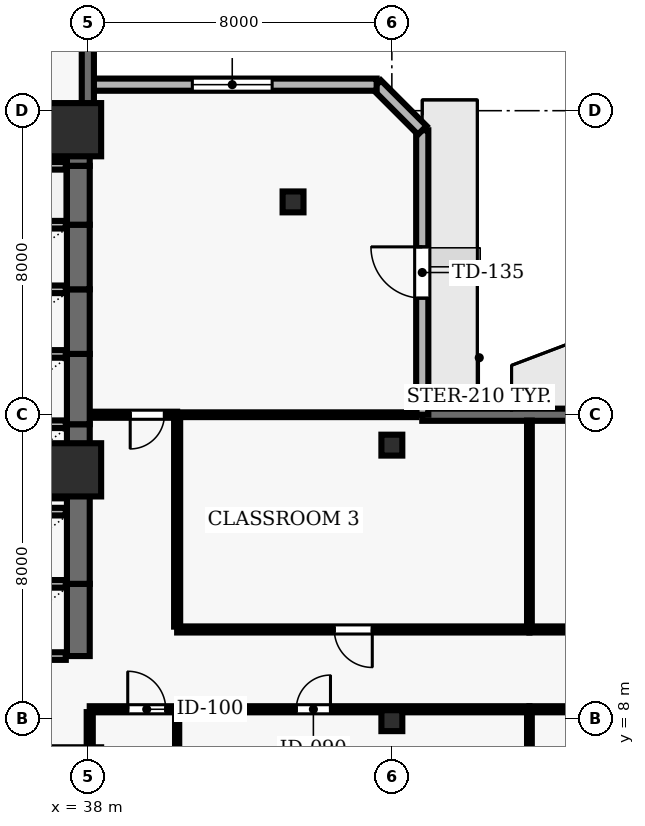
"""IFC4 building model, lengths in metres.
Left out: names, types, materials, properties, quantities, classifications, styles, units other than length and angle.
Written with IfcOpenShell. Run it as: python <this file> out.ifc"""

import sys

from ifc_helpers import new_model, si_unit, direction, frame, frame_2d, origin, origin_2d, place, context, subcontext, project, spatial, rectangle, hollow_rectangle, extrude, element, fill, save


model = new_model("IFC4")
c1 = context("Model", 3, precision=1e-05, world=origin(), true_north=direction((0.0, 1.0)))
c2 = subcontext(c1, "Body", "Model", "MODEL_VIEW")
j1 = project(units=[si_unit("LENGTHUNIT", "METRE"), si_unit("PLANEANGLEUNIT", "RADIAN")], contexts=[c1])
p1 = place(None, origin())
s1 = spatial("IfcSite", under=j1, at=p1, CompositionType="ELEMENT")
p2 = place(p1, origin())
s2 = spatial("IfcBuilding", under=s1, at=p2, CompositionType="ELEMENT")
p3 = place(p2, frame((0.0, 0.0, 85.6)))
s3 = spatial("IfcBuildingStorey", under=s2, at=p3, CompositionType="ELEMENT", Elevation=85.6)
for number, where, z_axis, x_axis in (
    (1, (37.65, 14.55, 0.0), (0.0, 0.0, 1.0), (1.0, 0.0, 0.0)),
    (2, (37.65, 23.5, 0.0), (0.0, 0.0, 1.0), (1.0, 0.0, 0.0)),
):
    element("IfcColumn", number, at=place(p3, frame(where, z_axis=z_axis, x_axis=x_axis)), inside=s3, PredefinedType="COLUMN", context=c2, shape_type="SweptSolid", body=[
        extrude(rectangle(XDim=1.4, YDim=1.4, at=origin_2d()), origin(), (0.0, 0.0, 1.0), 3.9),
    ])
for number, where, z_axis, x_axis in (
    (3, (46.0, 7.95, 0.0), (0.0, 0.0, 1.0), (1.0, 0.0, 0.0)),
    (4, (46.0, 15.2, 0.0), (0.0, 0.0, 1.0), (1.0, 0.0, 0.0)),
    (5, (43.4, 21.6, 0.0), (0.0, 0.0, 1.0), (1.0, 0.0, 0.0)),
):
    element("IfcColumn", number, at=place(p3, frame(where, z_axis=z_axis, x_axis=x_axis)), inside=s3, PredefinedType="COLUMN", context=c2, shape_type="SweptSolid", body=[
        extrude(hollow_rectangle(XDim=0.55, YDim=0.55, WallThickness=0.025, at=origin_2d()), origin(), (0.0, 0.0, 1.0), 3.9),
    ])
p4 = place(p3, frame((73.5, 16.0, 0.0), z_axis=(0.0, 0.0, 1.0), x_axis=(-1.0, 0.0, 0.0)))
e6 = element("IfcWall", 6, at=p4, inside=s3, PredefinedType="SOLIDWALL", context=c2, shape_type="SweptSolid", body=[
    extrude(rectangle(XDim=26.7, YDim=0.32, at=frame_2d((13.35, 0.0))), origin(), (0.0, 0.0, 1.0), 3.69),
])
p5 = place(p4, frame((12.025, 0.0, 0.0)))
e7 = element("IfcOpeningElement", 7, at=p5, cuts=e6, PredefinedType="OPENING", context=c2, shape_type="SweptSolid", body=[
    extrude(rectangle(XDim=1.0, YDim=2.2, at=frame_2d((0.5, 1.1))), frame((0.0, 0.17, 0.0), z_axis=(0.0, -1.0, 0.0), x_axis=(1.0, 0.0, 0.0)), (0.0, 0.0, 1.0), 0.34),
])
p6 = place(p4, frame((2.738, 0.0, 0.9)))
e8 = element("IfcOpeningElement", 8, at=p6, cuts=e6, PredefinedType="OPENING", context=c2, shape_type="SweptSolid", body=[
    extrude(rectangle(XDim=1.2, YDim=1.6, at=frame_2d((0.6, 0.8))), frame((0.0, 0.17, 0.0), z_axis=(0.0, -1.0, 0.0), x_axis=(1.0, 0.0, 0.0)), (0.0, 0.0, 1.0), 0.34),
])
p7 = place(p4, frame((8.513, 0.0, 0.9)))
e9 = element("IfcOpeningElement", 9, at=p7, cuts=e6, PredefinedType="OPENING", context=c2, shape_type="SweptSolid", body=[
    extrude(rectangle(XDim=1.2, YDim=1.6, at=frame_2d((0.6, 0.8))), frame((0.0, 0.17, 0.0), z_axis=(0.0, -1.0, 0.0), x_axis=(1.0, 0.0, 0.0)), (0.0, 0.0, 1.0), 0.34),
])
p8 = place(p4, frame((16.537, 0.0, 0.9)))
e10 = element("IfcOpeningElement", 10, at=p8, cuts=e6, PredefinedType="OPENING", context=c2, shape_type="SweptSolid", body=[
    extrude(rectangle(XDim=1.2, YDim=1.6, at=frame_2d((0.6, 0.8))), frame((0.0, 0.17, 0.0), z_axis=(0.0, -1.0, 0.0), x_axis=(1.0, 0.0, 0.0)), (0.0, 0.0, 1.0), 0.34),
])
p9 = place(p3, frame((46.8, 16.0, 0.0), z_axis=(0.0, 0.0, 1.0), x_axis=(0.0, 1.0, 0.0)))
e11 = element("IfcWall", 11, at=p9, inside=s3, PredefinedType="SOLIDWALL", context=c2, shape_type="SweptSolid", body=[
    extrude(rectangle(XDim=7.485, YDim=0.32, at=frame_2d((3.743, 0.0))), origin(), (0.0, 0.0, 1.0), 3.69),
])
p10 = place(p9, frame((3.067, 0.0, 0.0)))
e12 = element("IfcOpeningElement", 12, at=p10, cuts=e11, PredefinedType="OPENING", context=c2, shape_type="SweptSolid", body=[
    extrude(rectangle(XDim=1.35, YDim=2.2, at=frame_2d((0.675, 1.1))), frame((0.0, 0.17, 0.0), z_axis=(0.0, -1.0, 0.0), x_axis=(1.0, 0.0, 0.0)), (0.0, 0.0, 1.0), 0.34),
])
p11 = place(p3, frame((46.8, 23.485, 0.0), z_axis=(0.0, 0.0, 1.0), x_axis=(-0.707106781187, 0.707106781187, 0.0)))
e13 = element("IfcWall", 13, at=p11, inside=s3, PredefinedType="SOLIDWALL", context=c2, shape_type="SweptSolid", body=[
    extrude(rectangle(XDim=1.697, YDim=0.32, at=frame_2d((0.849, 0.0))), origin(), (0.0, 0.0, 1.0), 3.69),
])
p12 = place(p3, frame((45.6, 24.685, 0.0), z_axis=(0.0, 0.0, 1.0), x_axis=(-1.0, 0.0, 0.0)))
e14 = element("IfcWall", 14, at=p12, inside=s3, PredefinedType="SOLIDWALL", context=c2, shape_type="SweptSolid", body=[
    extrude(rectangle(XDim=7.6, YDim=0.32, at=frame_2d((3.8, 0.0))), origin(), (0.0, 0.0, 1.0), 3.69),
])
p13 = place(p12, frame((2.75, 0.0, 0.9)))
e15 = element("IfcOpeningElement", 15, at=p13, cuts=e14, PredefinedType="OPENING", context=c2, shape_type="SweptSolid", body=[
    extrude(rectangle(XDim=2.1, YDim=1.6, at=frame_2d((1.05, 0.8))), frame((0.0, 0.17, 0.0), z_axis=(0.0, -1.0, 0.0), x_axis=(1.0, 0.0, 0.0)), (0.0, 0.0, 1.0), 0.34),
])
p14 = place(p3, frame((38.0, 24.0, 0.0), z_axis=(0.0, 0.0, 1.0), x_axis=(0.0, 1.0, 0.0)))
e16 = element("IfcWall", 16, at=p14, inside=s3, PredefinedType="SOLIDWALL", context=c2, shape_type="SweptSolid", body=[
    extrude(rectangle(XDim=27.5, YDim=0.32, at=frame_2d((13.75, 0.0))), origin(), (0.0, 0.0, 1.0), 3.69),
])
p15 = place(p14, frame((13.333, 0.0, 0.0)))
e17 = element("IfcOpeningElement", 17, at=p15, cuts=e16, PredefinedType="OPENING", context=c2, shape_type="SweptSolid", body=[
    extrude(rectangle(XDim=1.0, YDim=2.2, at=frame_2d((0.5, 1.1))), frame((0.0, 0.17, 0.0), z_axis=(0.0, -1.0, 0.0), x_axis=(1.0, 0.0, 0.0)), (0.0, 0.0, 1.0), 0.34),
])
p16 = place(p14, frame((2.152, 0.0, 0.9)))
e18 = element("IfcOpeningElement", 18, at=p16, cuts=e16, PredefinedType="OPENING", context=c2, shape_type="SweptSolid", body=[
    extrude(rectangle(XDim=2.4, YDim=1.6, at=frame_2d((1.2, 0.8))), frame((0.0, 0.17, 0.0), z_axis=(0.0, -1.0, 0.0), x_axis=(1.0, 0.0, 0.0)), (0.0, 0.0, 1.0), 0.34),
])
p17 = place(p14, frame((7.956, 0.0, 0.9)))
e19 = element("IfcOpeningElement", 19, at=p17, cuts=e16, PredefinedType="OPENING", context=c2, shape_type="SweptSolid", body=[
    extrude(rectangle(XDim=2.4, YDim=1.6, at=frame_2d((1.2, 0.8))), frame((0.0, 0.17, 0.0), z_axis=(0.0, -1.0, 0.0), x_axis=(1.0, 0.0, 0.0)), (0.0, 0.0, 1.0), 0.34),
])
p18 = place(p14, frame((22.713, 0.0, 0.9)))
e20 = element("IfcOpeningElement", 20, at=p18, cuts=e16, PredefinedType="OPENING", context=c2, shape_type="SweptSolid", body=[
    extrude(rectangle(XDim=2.4, YDim=1.6, at=frame_2d((1.2, 0.8))), frame((0.0, 0.17, 0.0), z_axis=(0.0, -1.0, 0.0), x_axis=(1.0, 0.0, 0.0)), (0.0, 0.0, 1.0), 0.34),
])
p19 = place(p3, frame((37.75, 9.65, 0.0), z_axis=(0.0, 0.0, 1.0), x_axis=(0.0, 1.0, 0.0)))
e21 = element("IfcWall", 21, at=p19, inside=s3, PredefinedType="SHEAR", context=c2, shape_type="SweptSolid", body=[
    extrude(rectangle(XDim=1.9, YDim=0.6, at=frame_2d((0.95, 0.0))), origin(), (0.0, 0.0, 1.0), 3.69),
])
for number, where, z_axis, x_axis in (
    (22, (35.28, 9.65, 0.0), (0.0, 0.0, 1.0), (1.0, 0.0, 0.0)),
    (23, (37.42, 11.55, 0.0), (0.0, 0.0, 1.0), (-1.0, 0.0, 0.0)),
):
    element("IfcWall", number, at=place(p3, frame(where, z_axis=z_axis, x_axis=x_axis)), inside=s3, PredefinedType="SOLIDWALL", context=c2, shape_type="SweptSolid", body=[
        extrude(rectangle(XDim=2.14, YDim=0.2, at=frame_2d((1.07, 0.0))), origin(), (0.0, 0.0, 1.0), 3.69),
    ])
p20 = place(p3, frame((37.75, 11.55, 0.0), z_axis=(0.0, 0.0, 1.0), x_axis=(0.0, 1.0, 0.0)))
e24 = element("IfcWall", 24, at=p20, inside=s3, PredefinedType="SHEAR", context=c2, shape_type="SweptSolid", body=[
    extrude(rectangle(XDim=2.35, YDim=0.6, at=frame_2d((1.175, 0.0))), origin(), (0.0, 0.0, 1.0), 3.69),
])
p21 = place(p3, frame((37.42, 13.45, 0.0), z_axis=(0.0, 0.0, 1.0), x_axis=(-1.0, 0.0, 0.0)))
e25 = element("IfcWall", 25, at=p21, inside=s3, PredefinedType="SOLIDWALL", context=c2, shape_type="SweptSolid", body=[
    extrude(rectangle(XDim=2.14, YDim=0.2, at=frame_2d((1.07, 0.0))), origin(), (0.0, 0.0, 1.0), 3.69),
])
p22 = place(p3, frame((37.75, 13.9, 0.0), z_axis=(0.0, 0.0, 1.0), x_axis=(0.0, 1.0, 0.0)))
e26 = element("IfcWall", 26, at=p22, inside=s3, PredefinedType="SHEAR", context=c2, shape_type="SweptSolid", body=[
    extrude(rectangle(XDim=1.85, YDim=0.6, at=frame_2d((0.925, 0.0))), origin(), (0.0, 0.0, 1.0), 3.69),
])
for number, where, z_axis, x_axis in (
    (27, (35.28, 13.9, 0.0), (0.0, 0.0, 1.0), (1.0, 0.0, 0.0)),
    (28, (37.42, 15.75, 0.0), (0.0, 0.0, 1.0), (-1.0, 0.0, 0.0)),
):
    element("IfcWall", number, at=place(p3, frame(where, z_axis=z_axis, x_axis=x_axis)), inside=s3, PredefinedType="SOLIDWALL", context=c2, shape_type="SweptSolid", body=[
        extrude(rectangle(XDim=2.14, YDim=0.2, at=frame_2d((1.07, 0.0))), origin(), (0.0, 0.0, 1.0), 3.69),
    ])
p23 = place(p3, frame((37.75, 15.75, 0.0), z_axis=(0.0, 0.0, 1.0), x_axis=(0.0, 1.0, 0.0)))
e29 = element("IfcWall", 29, at=p23, inside=s3, PredefinedType="SHEAR", context=c2, shape_type="SweptSolid", body=[
    extrude(rectangle(XDim=1.85, YDim=0.6, at=frame_2d((0.925, 0.0))), origin(), (0.0, 0.0, 1.0), 3.69),
])
p24 = place(p3, frame((37.42, 17.6, 0.0), z_axis=(0.0, 0.0, 1.0), x_axis=(-1.0, 0.0, 0.0)))
e30 = element("IfcWall", 30, at=p24, inside=s3, PredefinedType="SOLIDWALL", context=c2, shape_type="SweptSolid", body=[
    extrude(rectangle(XDim=2.14, YDim=0.2, at=frame_2d((1.07, 0.0))), origin(), (0.0, 0.0, 1.0), 3.69),
])
p25 = place(p3, frame((37.75, 17.6, 0.0), z_axis=(0.0, 0.0, 1.0), x_axis=(0.0, 1.0, 0.0)))
e31 = element("IfcWall", 31, at=p25, inside=s3, PredefinedType="SHEAR", context=c2, shape_type="SweptSolid", body=[
    extrude(rectangle(XDim=1.7, YDim=0.6, at=frame_2d((0.85, 0.0))), origin(), (0.0, 0.0, 1.0), 3.69),
])
p26 = place(p3, frame((37.42, 19.3, 0.0), z_axis=(0.0, 0.0, 1.0), x_axis=(-1.0, 0.0, 0.0)))
e32 = element("IfcWall", 32, at=p26, inside=s3, PredefinedType="SOLIDWALL", context=c2, shape_type="SweptSolid", body=[
    extrude(rectangle(XDim=2.14, YDim=0.2, at=frame_2d((1.07, 0.0))), origin(), (0.0, 0.0, 1.0), 3.69),
])
p27 = place(p3, frame((37.75, 19.3, 0.0), z_axis=(0.0, 0.0, 1.0), x_axis=(0.0, 1.0, 0.0)))
e33 = element("IfcWall", 33, at=p27, inside=s3, PredefinedType="SHEAR", context=c2, shape_type="SweptSolid", body=[
    extrude(rectangle(XDim=1.7, YDim=0.6, at=frame_2d((0.85, 0.0))), origin(), (0.0, 0.0, 1.0), 3.69),
])
p28 = place(p3, frame((37.42, 21.0, 0.0), z_axis=(0.0, 0.0, 1.0), x_axis=(-1.0, 0.0, 0.0)))
e34 = element("IfcWall", 34, at=p28, inside=s3, PredefinedType="SOLIDWALL", context=c2, shape_type="SweptSolid", body=[
    extrude(rectangle(XDim=2.14, YDim=0.2, at=frame_2d((1.07, 0.0))), origin(), (0.0, 0.0, 1.0), 3.69),
])
p29 = place(p3, frame((37.75, 21.0, 0.0), z_axis=(0.0, 0.0, 1.0), x_axis=(0.0, 1.0, 0.0)))
e35 = element("IfcWall", 35, at=p29, inside=s3, PredefinedType="SHEAR", context=c2, shape_type="SweptSolid", body=[
    extrude(rectangle(XDim=1.55, YDim=0.6, at=frame_2d((0.775, 0.0))), origin(), (0.0, 0.0, 1.0), 3.69),
])
p30 = place(p3, frame((37.42, 22.55, 0.0), z_axis=(0.0, 0.0, 1.0), x_axis=(-1.0, 0.0, 0.0)))
e36 = element("IfcWall", 36, at=p30, inside=s3, PredefinedType="SOLIDWALL", context=c2, shape_type="SweptSolid", body=[
    extrude(rectangle(XDim=2.14, YDim=0.2, at=frame_2d((1.07, 0.0))), origin(), (0.0, 0.0, 1.0), 3.69),
])
p31 = place(p3, frame((37.75, 22.55, 0.0), z_axis=(0.0, 0.0, 1.0), x_axis=(0.0, 1.0, 0.0)))
e37 = element("IfcWall", 37, at=p31, inside=s3, PredefinedType="SHEAR", context=c2, shape_type="SweptSolid", body=[
    extrude(rectangle(XDim=1.5, YDim=0.6, at=frame_2d((0.75, 0.0))), origin(), (0.0, 0.0, 1.0), 3.69),
])
p32 = place(p3, frame((37.42, 24.05, 0.0), z_axis=(0.0, 0.0, 1.0), x_axis=(-1.0, 0.0, 0.0)))
e38 = element("IfcWall", 38, at=p32, inside=s3, PredefinedType="SOLIDWALL", context=c2, shape_type="SweptSolid", body=[
    extrude(rectangle(XDim=2.14, YDim=0.2, at=frame_2d((1.07, 0.0))), origin(), (0.0, 0.0, 1.0), 3.69),
])
p33 = place(p3, frame((38.05, 8.25, 0.0), z_axis=(0.0, 0.0, 1.0), x_axis=(1.0, 0.0, 0.0)))
e39 = element("IfcWall", 39, at=p33, inside=s3, PredefinedType="PARTITIONING", context=c2, shape_type="SweptSolid", body=[
    extrude(rectangle(XDim=2.3, YDim=0.16, at=frame_2d((1.15, 0.0))), origin(), (0.0, 0.0, 1.0), 2.995),
])
p34 = place(p33, frame((1.0, 0.0, 0.0)))
e40 = element("IfcOpeningElement", 40, at=p34, cuts=e39, PredefinedType="OPENING", context=c2, shape_type="SweptSolid", body=[
    extrude(rectangle(XDim=1.0, YDim=2.1, at=frame_2d((0.5, 1.05))), frame((0.0, 0.09, 0.0), z_axis=(0.0, -1.0, 0.0), x_axis=(1.0, 0.0, 0.0)), (0.0, 0.0, 1.0), 0.18),
])
p35 = place(p3, frame((40.35, 8.25, 0.0), z_axis=(0.0, 0.0, 1.0), x_axis=(1.0, 0.0, 0.0)))
e41 = element("IfcWall", 41, at=p35, inside=s3, PredefinedType="PARTITIONING", context=c2, shape_type="SweptSolid", body=[
    extrude(rectangle(XDim=9.27, YDim=0.16, at=frame_2d((4.635, 0.0))), origin(), (0.0, 0.0, 1.0), 2.995),
])
p36 = place(p35, frame((3.135, 0.0, 0.0)))
e42 = element("IfcOpeningElement", 42, at=p36, cuts=e41, PredefinedType="OPENING", context=c2, shape_type="SweptSolid", body=[
    extrude(rectangle(XDim=0.9, YDim=2.1, at=frame_2d((0.45, 1.05))), frame((0.0, 0.09, 0.0), z_axis=(0.0, -1.0, 0.0), x_axis=(1.0, 0.0, 0.0)), (0.0, 0.0, 1.0), 0.18),
])
p37 = place(p3, frame((40.35, 16.0, 0.0), z_axis=(0.0, 0.0, 1.0), x_axis=(1.0, 0.0, 0.0)))
e43 = element("IfcWall", 43, at=p37, inside=s3, PredefinedType="PARTITIONING", context=c2, shape_type="SweptSolid", body=[
    extrude(rectangle(XDim=6.295, YDim=0.125, at=frame_2d((3.147, 0.0))), origin(), (0.0, 0.0, 1.0), 3.39),
])
p38 = place(p3, frame((40.35, 16.0, 0.0), z_axis=(0.0, 0.0, 1.0), x_axis=(-1.0, 0.0, 0.0)))
e44 = element("IfcWall", 44, at=p38, inside=s3, PredefinedType="PARTITIONING", context=c2, shape_type="SweptSolid", body=[
    extrude(rectangle(XDim=2.27, YDim=0.16, at=frame_2d((1.135, 0.0))), origin(), (0.0, 0.0, 1.0), 3.69),
])
p39 = place(p38, frame((0.335, 0.0, 0.0)))
e45 = element("IfcOpeningElement", 45, at=p39, cuts=e44, PredefinedType="OPENING", context=c2, shape_type="SweptSolid", body=[
    extrude(rectangle(XDim=0.9, YDim=2.1, at=frame_2d((0.45, 1.05))), frame((0.0, 0.09, 0.0), z_axis=(0.0, -1.0, 0.0), x_axis=(1.0, 0.0, 0.0)), (0.0, 0.0, 1.0), 0.18),
])
p40 = place(p3, frame((49.62, 8.25, 0.0), z_axis=(0.0, 0.0, 1.0), x_axis=(1.0, 0.0, 0.0)))
e46 = element("IfcWall", 46, at=p40, inside=s3, PredefinedType="PARTITIONING", context=c2, shape_type="SweptSolid", body=[
    extrude(rectangle(XDim=9.62, YDim=0.16, at=frame_2d((4.81, 0.0))), origin(), (0.0, 0.0, 1.0), 2.995),
])
p41 = place(p40, frame((4.36, 0.0, 0.0)))
e47 = element("IfcOpeningElement", 47, at=p41, cuts=e46, PredefinedType="OPENING", context=c2, shape_type="SweptSolid", body=[
    extrude(rectangle(XDim=0.9, YDim=2.1, at=frame_2d((0.45, 1.05))), frame((0.0, 0.09, 0.0), z_axis=(0.0, -1.0, 0.0), x_axis=(1.0, 0.0, 0.0)), (0.0, 0.0, 1.0), 0.18),
])
p42 = place(p3, frame((49.62, 10.35, 0.0), z_axis=(0.0, 0.0, 1.0), x_axis=(-1.0, 0.0, 0.0)))
e48 = element("IfcWall", 48, at=p42, inside=s3, PredefinedType="PARTITIONING", context=c2, shape_type="SweptSolid", body=[
    extrude(rectangle(XDim=9.27, YDim=0.16, at=frame_2d((4.635, 0.0))), origin(), (0.0, 0.0, 1.0), 3.227),
])
p43 = place(p42, frame((4.135, 0.0, 0.0)))
e49 = element("IfcOpeningElement", 49, at=p43, cuts=e48, PredefinedType="OPENING", context=c2, shape_type="SweptSolid", body=[
    extrude(rectangle(XDim=1.0, YDim=2.1, at=frame_2d((0.5, 1.05))), frame((0.0, 0.09, 0.0), z_axis=(0.0, -1.0, 0.0), x_axis=(1.0, 0.0, 0.0)), (0.0, 0.0, 1.0), 0.18),
])
p44 = place(p3, frame((59.24, 10.35, 0.0), z_axis=(0.0, 0.0, 1.0), x_axis=(-1.0, 0.0, 0.0)))
e50 = element("IfcWall", 50, at=p44, inside=s3, PredefinedType="PARTITIONING", context=c2, shape_type="SweptSolid", body=[
    extrude(rectangle(XDim=9.62, YDim=0.16, at=frame_2d((4.81, 0.0))), origin(), (0.0, 0.0, 1.0), 3.227),
])
p45 = place(p44, frame((4.31, 0.0, 0.0)))
e51 = element("IfcOpeningElement", 51, at=p45, cuts=e50, PredefinedType="OPENING", context=c2, shape_type="SweptSolid", body=[
    extrude(rectangle(XDim=1.0, YDim=2.1, at=frame_2d((0.5, 1.05))), frame((0.0, 0.09, 0.0), z_axis=(0.0, -1.0, 0.0), x_axis=(1.0, 0.0, 0.0)), (0.0, 0.0, 1.0), 0.18),
])
p46 = place(p3, frame((38.05, 7.05, 0.0), z_axis=(0.0, 0.0, 1.0), x_axis=(0.0, 1.0, 0.0)))
e52 = element("IfcWall", 52, at=p46, inside=s3, PredefinedType="PARTITIONING", context=c2, shape_type="SweptSolid", body=[
    extrude(rectangle(XDim=1.125, YDim=0.16, at=frame_2d((0.562, 0.0))), origin(), (0.0, 0.0, 1.0), 2.995),
])
p47 = place(p3, frame((40.35, 0.09, 0.0), z_axis=(0.0, 0.0, 1.0), x_axis=(0.0, 1.0, 0.0)))
e53 = element("IfcWall", 53, at=p47, inside=s3, PredefinedType="MOVABLE", context=c2, shape_type="SweptSolid", body=[
    extrude(rectangle(XDim=8.085, YDim=0.11, at=frame_2d((4.042, 0.0))), origin(), (0.0, 0.0, 1.0), 3.69),
])
p48 = place(p3, frame((40.35, 10.425, 0.0), z_axis=(0.0, 0.0, 1.0), x_axis=(0.0, 1.0, 0.0)))
e54 = element("IfcWall", 54, at=p48, inside=s3, PredefinedType="PARTITIONING", context=c2, shape_type="SweptSolid", body=[
    extrude(rectangle(XDim=5.5, YDim=0.16, at=frame_2d((2.75, 0.0))), origin(), (0.0, 0.0, 1.0), 3.227),
])
p49 = place(p3, frame((49.62, 0.09, 0.0), z_axis=(0.0, 0.0, 1.0), x_axis=(0.0, 1.0, 0.0)))
e55 = element("IfcWall", 55, at=p49, inside=s3, PredefinedType="PARTITIONING", context=c2, shape_type="SweptSolid", body=[
    extrude(rectangle(XDim=8.085, YDim=0.125, at=frame_2d((4.042, 0.0))), origin(), (0.0, 0.0, 1.0), 3.69),
])
p50 = place(p3, frame((49.62, 10.425, 0.0), z_axis=(0.0, 0.0, 1.0), x_axis=(0.0, 1.0, 0.0)))
e56 = element("IfcWall", 56, at=p50, inside=s3, PredefinedType="PARTITIONING", context=c2, shape_type="SweptSolid", body=[
    extrude(rectangle(XDim=5.42, YDim=0.125, at=frame_2d((2.71, 0.0))), origin(), (0.0, 0.0, 1.0), 3.69),
])
p51 = place(p10, origin())
e57 = element("IfcDoor", 57, at=p51, inside=s3, OperationType="SINGLE_SWING_RIGHT", PredefinedType="DOOR", context=c2, shape_type="SweptSolid", body=[
    extrude(rectangle(XDim=1.35, YDim=2.2, at=frame_2d((0.675, 1.1))), frame((0.0, 0.025, 0.0), z_axis=(0.0, -1.0, 0.0), x_axis=(1.0, 0.0, 0.0)), (0.0, 0.0, 1.0), 0.05),
])
fill(e12, e57)
p52 = place(p13, origin())
e58 = element("IfcWindow", 58, at=p52, inside=s3, PartitioningType="SINGLE_PANEL", PredefinedType="WINDOW", context=c2, shape_type="SweptSolid", body=[
    extrude(rectangle(XDim=2.1, YDim=1.6, at=frame_2d((1.05, 0.8))), frame((0.0, 0.03, 0.0), z_axis=(0.0, -1.0, 0.0), x_axis=(1.0, 0.0, 0.0)), (0.0, 0.0, 1.0), 0.06),
])
fill(e15, e58)
p53 = place(p34, origin())
e59 = element("IfcDoor", 59, at=p53, inside=s3, OperationType="SINGLE_SWING_LEFT", PredefinedType="DOOR", context=c2, shape_type="SweptSolid", body=[
    extrude(rectangle(XDim=1.0, YDim=2.1, at=frame_2d((0.5, 1.05))), frame((0.0, 0.025, 0.0), z_axis=(0.0, -1.0, 0.0), x_axis=(1.0, 0.0, 0.0)), (0.0, 0.0, 1.0), 0.05),
])
fill(e40, e59)
p54 = place(p36, origin())
e60 = element("IfcDoor", 60, at=p54, inside=s3, OperationType="SINGLE_SWING_RIGHT", PredefinedType="DOOR", context=c2, shape_type="SweptSolid", body=[
    extrude(rectangle(XDim=0.9, YDim=2.1, at=frame_2d((0.45, 1.05))), frame((0.0, 0.025, 0.0), z_axis=(0.0, -1.0, 0.0), x_axis=(1.0, 0.0, 0.0)), (0.0, 0.0, 1.0), 0.05),
])
fill(e42, e60)
p55 = place(p43, origin())
e61 = element("IfcDoor", 61, at=p55, inside=s3, OperationType="SINGLE_SWING_LEFT", PredefinedType="DOOR", context=c2, shape_type="SweptSolid", body=[
    extrude(rectangle(XDim=1.0, YDim=2.1, at=frame_2d((0.5, 1.05))), frame((0.0, 0.025, 0.0), z_axis=(0.0, -1.0, 0.0), x_axis=(1.0, 0.0, 0.0)), (0.0, 0.0, 1.0), 0.05),
])
fill(e49, e61)
p56 = place(p39, origin())
e62 = element("IfcDoor", 62, at=p56, inside=s3, OperationType="SINGLE_SWING_RIGHT", PredefinedType="DOOR", context=c2, shape_type="SweptSolid", body=[
    extrude(rectangle(XDim=0.9, YDim=2.1, at=frame_2d((0.45, 1.05))), frame((0.0, 0.025, 0.0), z_axis=(0.0, -1.0, 0.0), x_axis=(1.0, 0.0, 0.0)), (0.0, 0.0, 1.0), 0.05),
])
fill(e45, e62)
save(model, sys.argv[1])
